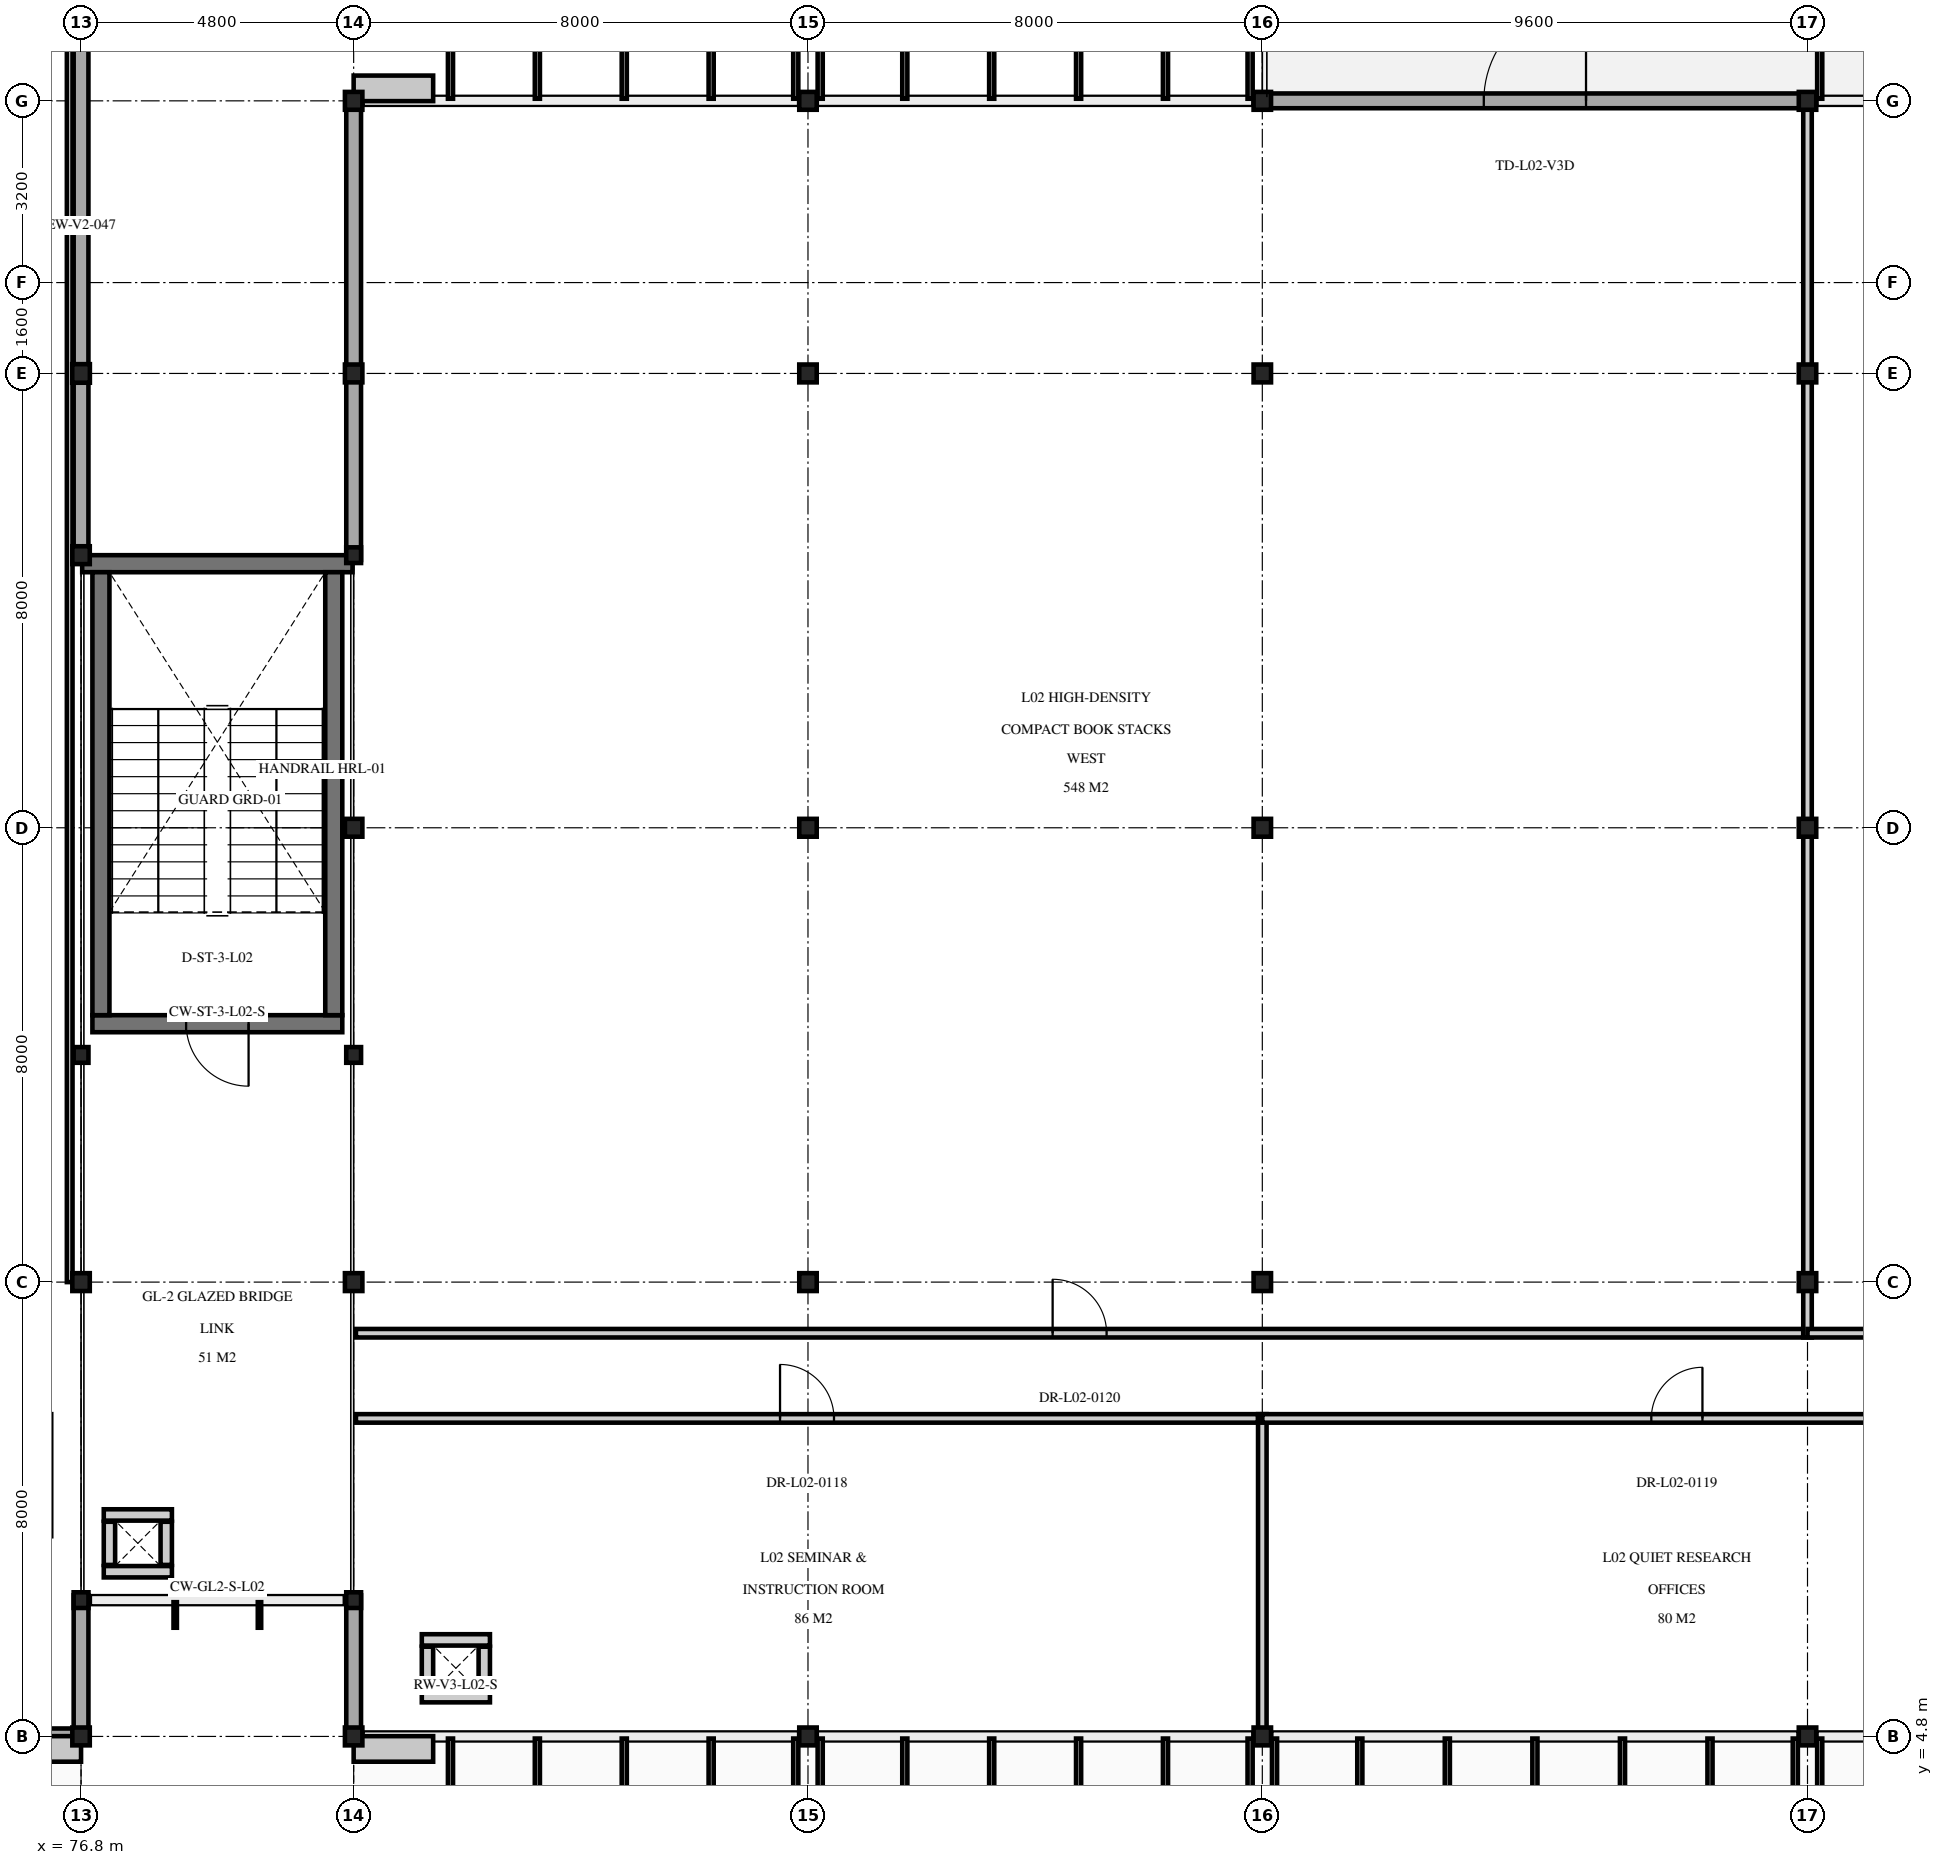
"""IFC4 building model, lengths in metres.
Left out: names, types, materials, properties, quantities, classifications, styles, units other than length and angle.
Written with IfcOpenShell. Run it as: python <this file> out.ifc"""

import sys

from ifc_helpers import new_model, si_unit, direction, frame, frame_2d, origin, origin_2d, place, context, subcontext, project, spatial, rectangle, i_section, extrude, element, fill, save


model = new_model("IFC4")
c1 = context("Model", 3, precision=1e-05, world=origin(), true_north=direction((0.0, 1.0)))
c2 = subcontext(c1, "Body", "Model", "MODEL_VIEW")
j1 = project(units=[si_unit("LENGTHUNIT", "METRE"), si_unit("PLANEANGLEUNIT", "RADIAN")], contexts=[c1])
p1 = place(None, origin())
s1 = spatial("IfcSite", under=j1, at=p1, CompositionType="ELEMENT")
p2 = place(p1, origin())
s2 = spatial("IfcBuilding", under=s1, at=p2, CompositionType="ELEMENT")
p3 = place(p2, frame((0.0, 0.0, 9.6)))
s3 = spatial("IfcBuildingStorey", under=s2, at=p3, CompositionType="ELEMENT", Elevation=9.6)
for number, where, z_axis, x_axis in (
    (1, (76.8, 4.8, 0.0), (0.0, 0.0, 1.0), (1.0, 0.0, 0.0)),
    (2, (76.8, 12.8, 0.0), (0.0, 0.0, 1.0), (1.0, 0.0, 0.0)),
    (3, (76.8, 25.6, 0.0), (0.0, 0.0, 1.0), (1.0, 0.0, 0.0)),
):
    element("IfcColumn", number, at=place(p3, frame(where, z_axis=z_axis, x_axis=x_axis)), inside=s3, PredefinedType="COLUMN", context=c2, shape_type="SweptSolid", body=[
        extrude(i_section(OverallWidth=0.307, OverallDepth=0.314, WebThickness=0.012, FlangeThickness=0.019, at=origin_2d()), origin(), (0.0, 0.0, 1.0), 4.5),
    ])
p4 = place(p3, frame((76.8, 28.8, 0.0), z_axis=(0.0, 0.0, 1.0), x_axis=(1.0, 0.0, 0.0)))
e4 = element("IfcColumn", 4, at=p4, inside=s3, PredefinedType="COLUMN", context=c2, shape_type="SweptSolid", body=[
    extrude(i_section(OverallWidth=0.311, OverallDepth=0.327, WebThickness=0.016, FlangeThickness=0.025, at=origin_2d()), origin(), (0.0, 0.0, 1.0), 4.5),
])
for number, where, z_axis, x_axis in (
    (5, (76.8, 7.2, 0.0), (0.0, 0.0, 1.0), (1.0, 0.0, 0.0)),
    (6, (76.8, 16.8, 0.0), (0.0, 0.0, 1.0), (1.0, 0.0, 0.0)),
):
    element("IfcColumn", number, at=place(p3, frame(where, z_axis=z_axis, x_axis=x_axis)), inside=s3, PredefinedType="COLUMN", context=c2, shape_type="SweptSolid", body=[
        extrude(i_section(OverallWidth=0.261, OverallDepth=0.276, WebThickness=0.015, FlangeThickness=0.025, at=origin_2d()), origin(), (0.0, 0.0, 1.0), 4.5),
    ])
for number, where, z_axis, x_axis in (
    (7, (81.6, 4.8, 0.0), (0.0, 0.0, 1.0), (1.0, 0.0, 0.0)),
    (8, (81.6, 12.8, 0.0), (0.0, 0.0, 1.0), (1.0, 0.0, 0.0)),
    (9, (81.6, 20.8, 0.0), (0.0, 0.0, 1.0), (1.0, 0.0, 0.0)),
    (10, (81.6, 28.8, 0.0), (0.0, 0.0, 1.0), (1.0, 0.0, 0.0)),
    (11, (81.6, 33.6, 0.0), (0.0, 0.0, 1.0), (1.0, 0.0, 0.0)),
    (12, (89.6, 4.8, 0.0), (0.0, 0.0, 1.0), (1.0, 0.0, 0.0)),
    (13, (89.6, 12.8, 0.0), (0.0, 0.0, 1.0), (1.0, 0.0, 0.0)),
    (14, (89.6, 20.8, 0.0), (0.0, 0.0, 1.0), (1.0, 0.0, 0.0)),
    (15, (89.6, 28.8, 0.0), (0.0, 0.0, 1.0), (1.0, 0.0, 0.0)),
    (16, (89.6, 33.6, 0.0), (0.0, 0.0, 1.0), (1.0, 0.0, 0.0)),
    (17, (97.6, 4.8, 0.0), (0.0, 0.0, 1.0), (1.0, 0.0, 0.0)),
    (18, (97.6, 12.8, 0.0), (0.0, 0.0, 1.0), (1.0, 0.0, 0.0)),
    (19, (97.6, 20.8, 0.0), (0.0, 0.0, 1.0), (1.0, 0.0, 0.0)),
    (20, (97.6, 28.8, 0.0), (0.0, 0.0, 1.0), (1.0, 0.0, 0.0)),
    (21, (97.6, 33.6, 0.0), (0.0, 0.0, 1.0), (1.0, 0.0, 0.0)),
    (22, (107.2, 4.8, 0.0), (0.0, 0.0, 1.0), (1.0, 0.0, 0.0)),
    (23, (107.2, 12.8, 0.0), (0.0, 0.0, 1.0), (1.0, 0.0, 0.0)),
    (24, (107.2, 20.8, 0.0), (0.0, 0.0, 1.0), (1.0, 0.0, 0.0)),
    (25, (107.2, 28.8, 0.0), (0.0, 0.0, 1.0), (1.0, 0.0, 0.0)),
    (26, (107.2, 33.6, 0.0), (0.0, 0.0, 1.0), (1.0, 0.0, 0.0)),
):
    element("IfcColumn", number, at=place(p3, frame(where, z_axis=z_axis, x_axis=x_axis)), inside=s3, PredefinedType="COLUMN", context=c2, shape_type="SweptSolid", body=[
        extrude(i_section(OverallWidth=0.307, OverallDepth=0.314, WebThickness=0.012, FlangeThickness=0.019, at=origin_2d()), origin(), (0.0, 0.0, 1.0), 4.5),
    ])
for number, where, z_axis, x_axis in (
    (27, (81.6, 7.2, 0.0), (0.0, 0.0, 1.0), (1.0, 0.0, 0.0)),
    (28, (81.6, 16.8, 0.0), (0.0, 0.0, 1.0), (1.0, 0.0, 0.0)),
    (29, (81.6, 25.6, 0.0), (0.0, 0.0, 1.0), (1.0, 0.0, 0.0)),
):
    element("IfcColumn", number, at=place(p3, frame(where, z_axis=z_axis, x_axis=x_axis)), inside=s3, PredefinedType="COLUMN", context=c2, shape_type="SweptSolid", body=[
        extrude(i_section(OverallWidth=0.261, OverallDepth=0.276, WebThickness=0.015, FlangeThickness=0.025, at=origin_2d()), origin(), (0.0, 0.0, 1.0), 4.5),
    ])
p5 = place(p3, frame((81.4, 17.35, 0.0), z_axis=(0.0, 0.0, 1.0), x_axis=(-1.0, 0.0, 0.0)))
e30 = element("IfcWall", 30, at=p5, inside=s3, PredefinedType="SHEAR", context=c2, shape_type="SweptSolid", body=[
    extrude(rectangle(XDim=4.4, YDim=0.3, at=frame_2d((2.2, 0.0))), origin(), (0.0, 0.0, 1.0), 4.26),
])
p6 = place(p5, frame((1.65, 0.0, 0.0)))
e31 = element("IfcOpeningElement", 31, at=p6, cuts=e30, PredefinedType="OPENING", context=c2, shape_type="SweptSolid", body=[
    extrude(rectangle(XDim=1.1, YDim=2.2, at=frame_2d((0.55, 1.1))), frame((0.0, 0.16, 0.0), z_axis=(0.0, -1.0, 0.0), x_axis=(1.0, 0.0, 0.0)), (0.0, 0.0, 1.0), 0.32),
])
p7 = place(p3, frame((76.82, 25.45, 0.0), z_axis=(0.0, 0.0, 1.0), x_axis=(1.0, 0.0, 0.0)))
e32 = element("IfcWall", 32, at=p7, inside=s3, PredefinedType="SHEAR", context=c2, shape_type="SweptSolid", body=[
    extrude(rectangle(XDim=4.76, YDim=0.3, at=frame_2d((2.38, 0.0))), origin(), (0.0, 0.0, 1.0), 4.26),
])
for number, where, z_axis, x_axis in (
    (33, (77.15, 17.5, 0.0), (0.0, 0.0, 1.0), (0.0, 1.0, 0.0)),
    (34, (81.25, 25.3, 0.0), (0.0, 0.0, 1.0), (0.0, -1.0, 0.0)),
):
    element("IfcWall", number, at=place(p3, frame(where, z_axis=z_axis, x_axis=x_axis)), inside=s3, PredefinedType="SHEAR", context=c2, shape_type="SweptSolid", body=[
        extrude(rectangle(XDim=7.8, YDim=0.3, at=frame_2d((3.9, 0.0))), origin(), (0.0, 0.0, 1.0), 4.26),
    ])
for number, where, z_axis, x_axis in (
    (35, (84.0, 5.5, 0.0), (0.0, 0.0, 1.0), (-1.0, 0.0, 0.0)),
    (36, (82.8, 6.5, 0.0), (0.0, 0.0, 1.0), (1.0, 0.0, 0.0)),
):
    element("IfcWall", number, at=place(p3, frame(where, z_axis=z_axis, x_axis=x_axis)), inside=s3, PredefinedType="PARTITIONING", context=c2, shape_type="SweptSolid", body=[
        extrude(rectangle(XDim=1.2, YDim=0.2, at=frame_2d((0.6, 0.0))), origin(), (0.0, 0.0, 1.0), 3.76),
    ])
for number, where, z_axis, x_axis in (
    (37, (82.9, 5.62, 0.0), (0.0, 0.0, 1.0), (0.0, 1.0, 0.0)),
    (38, (83.9, 6.38, 0.0), (0.0, 0.0, 1.0), (0.0, -1.0, 0.0)),
):
    element("IfcWall", number, at=place(p3, frame(where, z_axis=z_axis, x_axis=x_axis)), inside=s3, PredefinedType="PARTITIONING", context=c2, shape_type="SweptSolid", body=[
        extrude(rectangle(XDim=0.76, YDim=0.2, at=frame_2d((0.38, 0.0))), origin(), (0.0, 0.0, 1.0), 3.76),
    ])
for number, where, z_axis, x_axis in (
    (39, (78.4, 7.7, 0.0), (0.0, 0.0, 1.0), (-1.0, 0.0, 0.0)),
    (40, (77.2, 8.7, 0.0), (0.0, 0.0, 1.0), (1.0, 0.0, 0.0)),
):
    element("IfcWall", number, at=place(p3, frame(where, z_axis=z_axis, x_axis=x_axis)), inside=s3, PredefinedType="PARTITIONING", context=c2, shape_type="SweptSolid", body=[
        extrude(rectangle(XDim=1.2, YDim=0.2, at=frame_2d((0.6, 0.0))), origin(), (0.0, 0.0, 1.0), 3.76),
    ])
for number, where, z_axis, x_axis in (
    (41, (77.3, 7.82, 0.0), (0.0, 0.0, 1.0), (0.0, 1.0, 0.0)),
    (42, (78.3, 8.58, 0.0), (0.0, 0.0, 1.0), (0.0, -1.0, 0.0)),
):
    element("IfcWall", number, at=place(p3, frame(where, z_axis=z_axis, x_axis=x_axis)), inside=s3, PredefinedType="PARTITIONING", context=c2, shape_type="SweptSolid", body=[
        extrude(rectangle(XDim=0.76, YDim=0.2, at=frame_2d((0.38, 0.0))), origin(), (0.0, 0.0, 1.0), 3.76),
    ])
p8 = place(p3, frame((76.885, 4.8, 0.0), z_axis=(0.0, 0.0, 1.0), x_axis=(-1.0, 0.0, 0.0)))
e43 = element("IfcWall", 43, at=p8, inside=s3, PredefinedType="SOLIDWALL", context=c2, shape_type="SweptSolid", body=[
    extrude(rectangle(XDim=9.77, YDim=0.28, at=frame_2d((4.885, 0.0))), origin(), (0.0, 0.0, 1.0), 3.925),
])
p9 = place(p8, frame((3.685, 0.0, 0.95)))
e44 = element("IfcOpeningElement", 44, at=p9, cuts=e43, PredefinedType="OPENING", context=c2, shape_type="SweptSolid", body=[
    extrude(rectangle(XDim=2.4, YDim=2.1, at=frame_2d((1.2, 1.05))), frame((0.0, 0.15, 0.0), z_axis=(0.0, -1.0, 0.0), x_axis=(1.0, 0.0, 0.0)), (0.0, 0.0, 1.0), 0.3),
])
p10 = place(p3, frame((76.8, 7.285, 0.0), z_axis=(0.0, 0.0, 1.0), x_axis=(0.0, -1.0, 0.0)))
e45 = element("IfcWall", 45, at=p10, inside=s3, PredefinedType="SOLIDWALL", context=c2, shape_type="SweptSolid", body=[
    extrude(rectangle(XDim=2.57, YDim=0.26, at=frame_2d((1.285, 0.0))), origin(), (0.0, 0.0, 1.0), 3.845),
])
p11 = place(p3, frame((76.8, 36.885, 0.0), z_axis=(0.0, 0.0, 1.0), x_axis=(0.0, -1.0, 0.0)))
e46 = element("IfcWall", 46, at=p11, inside=s3, PredefinedType="SOLIDWALL", context=c2, shape_type="SweptSolid", body=[
    extrude(rectangle(XDim=11.37, YDim=0.26, at=frame_2d((5.685, 0.0))), origin(), (0.0, 0.0, 1.0), 3.845),
])
p12 = place(p3, frame((97.515, 33.6, 0.0), z_axis=(0.0, 0.0, 1.0), x_axis=(1.0, 0.0, 0.0)))
e47 = element("IfcWall", 47, at=p12, inside=s3, PredefinedType="SOLIDWALL", context=c2, shape_type="SweptSolid", body=[
    extrude(rectangle(XDim=9.77, YDim=0.26, at=frame_2d((4.885, 0.0))), origin(), (0.0, 0.0, 1.0), 3.775),
])
p13 = place(p12, frame((3.985, 0.0, 0.0)))
e48 = element("IfcOpeningElement", 48, at=p13, cuts=e47, PredefinedType="OPENING", context=c2, shape_type="SweptSolid", body=[
    extrude(rectangle(XDim=1.8, YDim=2.3, at=frame_2d((0.9, 1.15))), frame((0.0, 0.14, 0.0), z_axis=(0.0, -1.0, 0.0), x_axis=(1.0, 0.0, 0.0)), (0.0, 0.0, 1.0), 0.28),
])
p14 = place(p3, frame((81.6, 4.715, 0.0), z_axis=(0.0, 0.0, 1.0), x_axis=(0.0, 1.0, 0.0)))
e49 = element("IfcWall", 49, at=p14, inside=s3, PredefinedType="SOLIDWALL", context=c2, shape_type="SweptSolid", body=[
    extrude(rectangle(XDim=2.57, YDim=0.26, at=frame_2d((1.285, 0.0))), origin(), (0.0, 0.0, 1.0), 3.775),
])
p15 = place(p3, frame((81.6, 25.515, 0.0), z_axis=(0.0, 0.0, 1.0), x_axis=(0.0, 1.0, 0.0)))
e50 = element("IfcWall", 50, at=p15, inside=s3, PredefinedType="SOLIDWALL", context=c2, shape_type="SweptSolid", body=[
    extrude(rectangle(XDim=8.17, YDim=0.26, at=frame_2d((4.085, 0.0))), origin(), (0.0, 0.0, 1.0), 3.775),
])
p16 = place(p3, frame((76.6, 12.8, 0.0), z_axis=(0.0, 0.0, 1.0), x_axis=(0.0, 1.0, 0.0)))
e51 = element("IfcWall", 51, at=p16, inside=s3, PredefinedType="MOVABLE", context=c2, shape_type="SweptSolid", body=[
    extrude(rectangle(XDim=23.96, YDim=0.1, at=frame_2d((11.98, 0.0))), origin(), (0.0, 0.0, 1.0), 3.925),
])
p17 = place(p3, frame((81.64, 10.4, 0.0), z_axis=(0.0, 0.0, 1.0), x_axis=(1.0, 0.0, 0.0)))
e52 = element("IfcWall", 52, at=p17, inside=s3, PredefinedType="PARTITIONING", context=c2, shape_type="SweptSolid", body=[
    extrude(rectangle(XDim=15.885, YDim=0.15, at=frame_2d((7.942, 0.0))), origin(), (0.0, 0.0, 1.0), 3.775),
])
p18 = place(p17, frame((7.468, 0.0, 0.0)))
e53 = element("IfcOpeningElement", 53, at=p18, cuts=e52, PredefinedType="OPENING", context=c2, shape_type="SweptSolid", body=[
    extrude(rectangle(XDim=0.95, YDim=2.15, at=frame_2d((0.475, 1.075))), frame((0.0, 0.085, 0.0), z_axis=(0.0, -1.0, 0.0), x_axis=(1.0, 0.0, 0.0)), (0.0, 0.0, 1.0), 0.17),
])
p19 = place(p3, frame((97.6, 4.84, 0.0), z_axis=(0.0, 0.0, 1.0), x_axis=(0.0, 1.0, 0.0)))
e54 = element("IfcWall", 54, at=p19, inside=s3, PredefinedType="PARTITIONING", context=c2, shape_type="SweptSolid", body=[
    extrude(rectangle(XDim=5.635, YDim=0.15, at=frame_2d((2.817, 0.0))), origin(), (0.0, 0.0, 1.0), 3.775),
])
p20 = place(p3, frame((97.6, 10.4, 0.0), z_axis=(0.0, 0.0, 1.0), x_axis=(1.0, 0.0, 0.0)))
e55 = element("IfcWall", 55, at=p20, inside=s3, PredefinedType="PARTITIONING", context=c2, shape_type="SweptSolid", body=[
    extrude(rectangle(XDim=14.6, YDim=0.15, at=frame_2d((7.3, 0.0))), origin(), (0.0, 0.0, 1.0), 3.775),
])
p21 = place(p20, frame((6.85, 0.0, 0.0)))
e56 = element("IfcOpeningElement", 56, at=p21, cuts=e55, PredefinedType="OPENING", context=c2, shape_type="SweptSolid", body=[
    extrude(rectangle(XDim=0.9, YDim=2.15, at=frame_2d((0.45, 1.075))), frame((0.0, 0.085, 0.0), z_axis=(0.0, -1.0, 0.0), x_axis=(1.0, 0.0, 0.0)), (0.0, 0.0, 1.0), 0.17),
])
p22 = place(p3, frame((81.64, 11.9, 0.0), z_axis=(0.0, 0.0, 1.0), x_axis=(1.0, 0.0, 0.0)))
e57 = element("IfcWall", 57, at=p22, inside=s3, PredefinedType="PARTITIONING", context=c2, shape_type="SweptSolid", body=[
    extrude(rectangle(XDim=25.485, YDim=0.15, at=frame_2d((12.743, 0.0))), origin(), (0.0, 0.0, 1.0), 3.775),
])
p23 = place(p22, frame((12.268, 0.0, 0.0)))
e58 = element("IfcOpeningElement", 58, at=p23, cuts=e57, PredefinedType="OPENING", context=c2, shape_type="SweptSolid", body=[
    extrude(rectangle(XDim=0.95, YDim=2.15, at=frame_2d((0.475, 1.075))), frame((0.0, 0.085, 0.0), z_axis=(0.0, -1.0, 0.0), x_axis=(1.0, 0.0, 0.0)), (0.0, 0.0, 1.0), 0.17),
])
p24 = place(p3, frame((107.2, 11.825, 0.0), z_axis=(0.0, 0.0, 1.0), x_axis=(0.0, 1.0, 0.0)))
e59 = element("IfcWall", 59, at=p24, inside=s3, PredefinedType="PARTITIONING", context=c2, shape_type="SweptSolid", body=[
    extrude(rectangle(XDim=21.735, YDim=0.15, at=frame_2d((10.868, 0.0))), origin(), (0.0, 0.0, 1.0), 3.775),
])
p25 = place(p3, frame((107.2, 11.9, 0.0), z_axis=(0.0, 0.0, 1.0), x_axis=(1.0, 0.0, 0.0)))
e60 = element("IfcWall", 60, at=p25, inside=s3, PredefinedType="PARTITIONING", context=c2, shape_type="SweptSolid", body=[
    extrude(rectangle(XDim=17.325, YDim=0.15, at=frame_2d((8.663, 0.0))), origin(), (0.0, 0.0, 1.0), 3.775),
])
p26 = place(p25, frame((7.688, 0.0, 0.0)))
e61 = element("IfcOpeningElement", 61, at=p26, cuts=e60, PredefinedType="OPENING", context=c2, shape_type="SweptSolid", body=[
    extrude(rectangle(XDim=0.95, YDim=2.15, at=frame_2d((0.475, 1.075))), frame((0.0, 0.085, 0.0), z_axis=(0.0, -1.0, 0.0), x_axis=(1.0, 0.0, 0.0)), (0.0, 0.0, 1.0), 0.17),
])
p27 = place(p6, origin())
e62 = element("IfcDoor", 62, at=p27, inside=s3, OperationType="SINGLE_SWING_LEFT", PredefinedType="DOOR", context=c2, shape_type="SweptSolid", body=[
    extrude(rectangle(XDim=1.1, YDim=2.2, at=frame_2d((0.55, 1.1))), frame((0.0, 0.025, 0.0), z_axis=(0.0, -1.0, 0.0), x_axis=(1.0, 0.0, 0.0)), (0.0, 0.0, 1.0), 0.05),
])
fill(e31, e62)
p28 = place(p13, origin())
e63 = element("IfcDoor", 63, at=p28, inside=s3, OperationType="SINGLE_SWING_RIGHT", PredefinedType="DOOR", context=c2, shape_type="SweptSolid", body=[
    extrude(rectangle(XDim=1.8, YDim=2.3, at=frame_2d((0.9, 1.15))), frame((0.0, 0.025, 0.0), z_axis=(0.0, -1.0, 0.0), x_axis=(1.0, 0.0, 0.0)), (0.0, 0.0, 1.0), 0.05),
])
fill(e48, e63)
p29 = place(p18, origin())
e64 = element("IfcDoor", 64, at=p29, inside=s3, OperationType="SINGLE_SWING_LEFT", PredefinedType="DOOR", context=c2, shape_type="SweptSolid", body=[
    extrude(rectangle(XDim=0.95, YDim=2.15, at=frame_2d((0.475, 1.075))), frame((0.0, 0.025, 0.0), z_axis=(0.0, -1.0, 0.0), x_axis=(1.0, 0.0, 0.0)), (0.0, 0.0, 1.0), 0.05),
])
fill(e53, e64)
p30 = place(p21, origin())
e65 = element("IfcDoor", 65, at=p30, inside=s3, OperationType="SINGLE_SWING_RIGHT", PredefinedType="DOOR", context=c2, shape_type="SweptSolid", body=[
    extrude(rectangle(XDim=0.9, YDim=2.15, at=frame_2d((0.45, 1.075))), frame((0.0, 0.025, 0.0), z_axis=(0.0, -1.0, 0.0), x_axis=(1.0, 0.0, 0.0)), (0.0, 0.0, 1.0), 0.05),
])
fill(e56, e65)
p31 = place(p23, origin())
e66 = element("IfcDoor", 66, at=p31, inside=s3, OperationType="SINGLE_SWING_LEFT", PredefinedType="DOOR", context=c2, shape_type="SweptSolid", body=[
    extrude(rectangle(XDim=0.95, YDim=2.15, at=frame_2d((0.475, 1.075))), frame((0.0, 0.025, 0.0), z_axis=(0.0, -1.0, 0.0), x_axis=(1.0, 0.0, 0.0)), (0.0, 0.0, 1.0), 0.05),
])
fill(e58, e66)
save(model, sys.argv[1])
